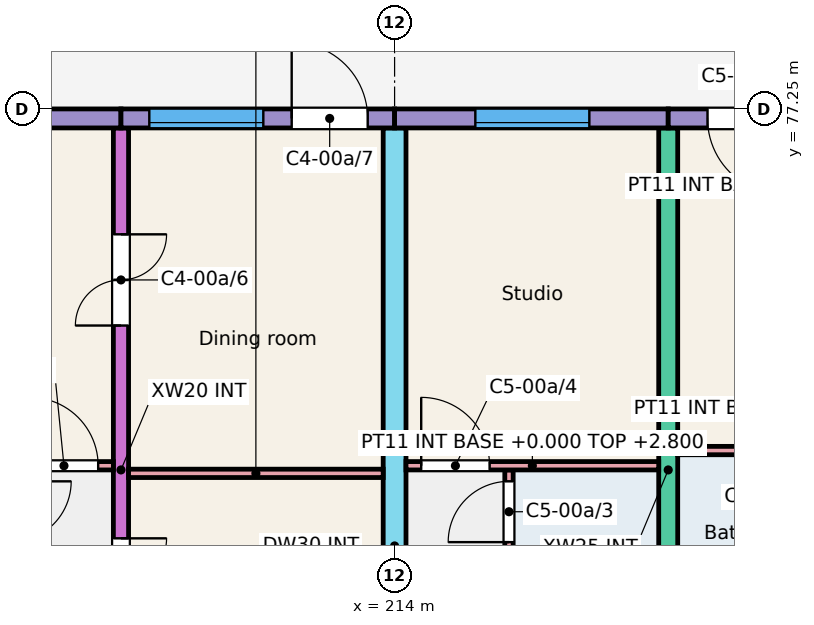
"""IFC4 building model, lengths in metres.
Left out: names, types, materials, properties, quantities, classifications, styles, units other than length and angle.
Written with IfcOpenShell. Run it as: python <this file> out.ifc"""

import sys

from ifc_helpers import new_model, si_unit, direction, frame, frame_2d, origin, place, context, subcontext, project, spatial, rectangle, extrude, element, fill, save


model = new_model("IFC4")
c1 = context("Model", 3, precision=1e-05, world=origin(), true_north=direction((0.0, 1.0)))
c2 = subcontext(c1, "Body", "Model", "MODEL_VIEW")
j1 = project(units=[si_unit("LENGTHUNIT", "METRE"), si_unit("PLANEANGLEUNIT", "RADIAN")], contexts=[c1])
p1 = place(None, origin())
s1 = spatial("IfcSite", under=j1, at=p1, CompositionType="ELEMENT")
p2 = place(p1, origin())
s2 = spatial("IfcBuilding", under=s1, at=p2, CompositionType="ELEMENT")
p3 = place(p2, origin())
s3 = spatial("IfcBuildingStorey", under=s2, at=p3, CompositionType="ELEMENT", Elevation=0.0)
p4 = place(p3, frame((210.4, 68.0, -0.25), z_axis=(0.0, 0.0, 1.0), x_axis=(0.0, 1.0, 0.0)))
e1 = element("IfcWall", 1, at=p4, inside=s3, PredefinedType="SHEAR", context=c2, shape_type="SweptSolid", body=[
    extrude(rectangle(XDim=9.0, YDim=0.2, at=frame_2d((4.5, 0.0))), origin(), (0.0, 0.0, 1.0), 3.25),
])
p5 = place(p4, frame((2.4, 0.0, 0.25)))
e2 = element("IfcOpeningElement", 2, at=p5, cuts=e1, PredefinedType="OPENING", context=c2, shape_type="SweptSolid", body=[
    extrude(rectangle(XDim=1.2, YDim=2.1, at=frame_2d((0.6, 1.05))), frame((0.0, 0.11, 0.0), z_axis=(0.0, -1.0, 0.0), x_axis=(1.0, 0.0, 0.0)), (0.0, 0.0, 1.0), 0.22),
])
p6 = place(p4, frame((6.4, 0.0, 0.25)))
e3 = element("IfcOpeningElement", 3, at=p6, cuts=e1, PredefinedType="OPENING", context=c2, shape_type="SweptSolid", body=[
    extrude(rectangle(XDim=1.2, YDim=2.1, at=frame_2d((0.6, 1.05))), frame((0.0, 0.11, 0.0), z_axis=(0.0, -1.0, 0.0), x_axis=(1.0, 0.0, 0.0)), (0.0, 0.0, 1.0), 0.22),
])
p7 = place(p3, frame((214.0, 66.0, -0.25), z_axis=(0.0, 0.0, 1.0), x_axis=(0.0, 1.0, 0.0)))
e4 = element("IfcWall", 4, at=p7, inside=s3, PredefinedType="SHEAR", context=c2, shape_type="SweptSolid", body=[
    extrude(rectangle(XDim=11.0, YDim=0.3, at=frame_2d((5.5, 0.0))), origin(), (0.0, 0.0, 1.0), 3.25),
])
p8 = place(p7, frame((0.3, 0.0, 0.25)))
e5 = element("IfcOpeningElement", 5, at=p8, cuts=e4, PredefinedType="OPENING", context=c2, shape_type="SweptSolid", body=[
    extrude(rectangle(XDim=1.2, YDim=2.1, at=frame_2d((0.6, 1.05))), frame((0.0, 0.16, 0.0), z_axis=(0.0, -1.0, 0.0), x_axis=(1.0, 0.0, 0.0)), (0.0, 0.0, 1.0), 0.32),
])
p9 = place(p3, frame((217.6, 68.0, -0.25), z_axis=(0.0, 0.0, 1.0), x_axis=(0.0, 1.0, 0.0)))
e6 = element("IfcWall", 6, at=p9, inside=s3, PredefinedType="SHEAR", context=c2, shape_type="SweptSolid", body=[
    extrude(rectangle(XDim=9.0, YDim=0.25, at=frame_2d((4.5, 0.0))), origin(), (0.0, 0.0, 1.0), 3.25),
])
p10 = place(p3, frame((206.8, 77.125, -0.25), z_axis=(0.0, 0.0, 1.0), x_axis=(1.0, 0.0, 0.0)))
e7 = element("IfcWall", 7, at=p10, inside=s3, PredefinedType="SOLIDWALL", context=c2, shape_type="SweptSolid", body=[
    extrude(rectangle(XDim=3.6, YDim=0.25, at=frame_2d((1.8, 0.0))), origin(), (0.0, 0.0, 1.0), 3.25),
])
p11 = place(p10, frame((1.062, 0.0, 1.15)))
e8 = element("IfcOpeningElement", 8, at=p11, cuts=e7, PredefinedType="OPENING", context=c2, shape_type="SweptSolid", body=[
    extrude(rectangle(XDim=1.5, YDim=1.5, at=frame_2d((0.75, 0.75))), frame((0.0, 0.135, 0.0), z_axis=(0.0, -1.0, 0.0), x_axis=(1.0, 0.0, 0.0)), (0.0, 0.0, 1.0), 0.27),
])
p12 = place(p3, frame((210.4, 77.125, -0.25), z_axis=(0.0, 0.0, 1.0), x_axis=(1.0, 0.0, 0.0)))
e9 = element("IfcWall", 9, at=p12, inside=s3, PredefinedType="SOLIDWALL", context=c2, shape_type="SweptSolid", body=[
    extrude(rectangle(XDim=3.6, YDim=0.25, at=frame_2d((1.8, 0.0))), origin(), (0.0, 0.0, 1.0), 3.25),
])
p13 = place(p12, frame((0.373, 0.0, 1.15)))
e10 = element("IfcOpeningElement", 10, at=p13, cuts=e9, PredefinedType="OPENING", context=c2, shape_type="SweptSolid", body=[
    extrude(rectangle(XDim=1.5, YDim=1.5, at=frame_2d((0.75, 0.75))), frame((0.0, 0.135, 0.0), z_axis=(0.0, -1.0, 0.0), x_axis=(1.0, 0.0, 0.0)), (0.0, 0.0, 1.0), 0.27),
])
p14 = place(p12, frame((2.246, 0.0, 0.25)))
e11 = element("IfcOpeningElement", 11, at=p14, cuts=e9, PredefinedType="OPENING", context=c2, shape_type="SweptSolid", body=[
    extrude(rectangle(XDim=1.0, YDim=2.1, at=frame_2d((0.5, 1.05))), frame((0.0, 0.135, 0.0), z_axis=(0.0, -1.0, 0.0), x_axis=(1.0, 0.0, 0.0)), (0.0, 0.0, 1.0), 0.27),
])
p15 = place(p3, frame((214.0, 77.125, -0.25), z_axis=(0.0, 0.0, 1.0), x_axis=(1.0, 0.0, 0.0)))
e12 = element("IfcWall", 12, at=p15, inside=s3, PredefinedType="SOLIDWALL", context=c2, shape_type="SweptSolid", body=[
    extrude(rectangle(XDim=3.6, YDim=0.25, at=frame_2d((1.8, 0.0))), origin(), (0.0, 0.0, 1.0), 3.25),
])
p16 = place(p15, frame((1.062, 0.0, 1.15)))
e13 = element("IfcOpeningElement", 13, at=p16, cuts=e12, PredefinedType="OPENING", context=c2, shape_type="SweptSolid", body=[
    extrude(rectangle(XDim=1.5, YDim=1.5, at=frame_2d((0.75, 0.75))), frame((0.0, 0.135, 0.0), z_axis=(0.0, -1.0, 0.0), x_axis=(1.0, 0.0, 0.0)), (0.0, 0.0, 1.0), 0.27),
])
p17 = place(p3, frame((217.6, 77.125, -0.25), z_axis=(0.0, 0.0, 1.0), x_axis=(1.0, 0.0, 0.0)))
e14 = element("IfcWall", 14, at=p17, inside=s3, PredefinedType="SOLIDWALL", context=c2, shape_type="SweptSolid", body=[
    extrude(rectangle(XDim=3.6, YDim=0.25, at=frame_2d((1.8, 0.0))), origin(), (0.0, 0.0, 1.0), 3.25),
])
p18 = place(p17, frame((1.796, 0.0, 1.15)))
e15 = element("IfcOpeningElement", 15, at=p18, cuts=e14, PredefinedType="OPENING", context=c2, shape_type="SweptSolid", body=[
    extrude(rectangle(XDim=1.5, YDim=1.5, at=frame_2d((0.75, 0.75))), frame((0.0, 0.135, 0.0), z_axis=(0.0, -1.0, 0.0), x_axis=(1.0, 0.0, 0.0)), (0.0, 0.0, 1.0), 0.27),
])
p19 = place(p17, frame((0.517, 0.0, 0.25)))
e16 = element("IfcOpeningElement", 16, at=p19, cuts=e14, PredefinedType="OPENING", context=c2, shape_type="SweptSolid", body=[
    extrude(rectangle(XDim=1.0, YDim=2.1, at=frame_2d((0.5, 1.05))), frame((0.0, 0.135, 0.0), z_axis=(0.0, -1.0, 0.0), x_axis=(1.0, 0.0, 0.0)), (0.0, 0.0, 1.0), 0.27),
])
p20 = place(p3, frame((206.925, 72.555, 0.0), z_axis=(0.0, 0.0, 1.0), x_axis=(1.0, 0.0, 0.0)))
e17 = element("IfcWall", 17, at=p20, inside=s3, PredefinedType="PARTITIONING", context=c2, shape_type="SweptSolid", body=[
    extrude(rectangle(XDim=3.375, YDim=0.11, at=frame_2d((1.688, 0.0))), origin(), (0.0, 0.0, 1.0), 2.8),
])
p21 = place(p20, frame((2.275, 0.0, 0.0)))
e18 = element("IfcOpeningElement", 18, at=p21, cuts=e17, PredefinedType="OPENING", context=c2, shape_type="SweptSolid", body=[
    extrude(rectangle(XDim=0.9, YDim=2.1, at=frame_2d((0.45, 1.05))), frame((0.0, 0.065, 0.0), z_axis=(0.0, -1.0, 0.0), x_axis=(1.0, 0.0, 0.0)), (0.0, 0.0, 1.0), 0.13),
])
p22 = place(p3, frame((210.5, 72.455, 0.0), z_axis=(0.0, 0.0, 1.0), x_axis=(1.0, 0.0, 0.0)))
e19 = element("IfcWall", 19, at=p22, inside=s3, PredefinedType="PARTITIONING", context=c2, shape_type="SweptSolid", body=[
    extrude(rectangle(XDim=3.35, YDim=0.11, at=frame_2d((1.675, 0.0))), origin(), (0.0, 0.0, 1.0), 2.8),
])
p23 = place(p3, frame((215.505, 68.0, 0.0), z_axis=(0.0, 0.0, 1.0), x_axis=(0.0, 1.0, 0.0)))
e20 = element("IfcWall", 20, at=p23, inside=s3, PredefinedType="PARTITIONING", context=c2, shape_type="SweptSolid", body=[
    extrude(rectangle(XDim=4.5, YDim=0.11, at=frame_2d((2.25, 0.0))), origin(), (0.0, 0.0, 1.0), 2.8),
])
p24 = place(p23, frame((0.2, 0.0, 0.0)))
e21 = element("IfcOpeningElement", 21, at=p24, cuts=e20, PredefinedType="OPENING", context=c2, shape_type="SweptSolid", body=[
    extrude(rectangle(XDim=0.8, YDim=2.1, at=frame_2d((0.4, 1.05))), frame((0.0, 0.065, 0.0), z_axis=(0.0, -1.0, 0.0), x_axis=(1.0, 0.0, 0.0)), (0.0, 0.0, 1.0), 0.13),
])
p25 = place(p23, frame((3.55, 0.0, 0.0)))
e22 = element("IfcOpeningElement", 22, at=p25, cuts=e20, PredefinedType="OPENING", context=c2, shape_type="SweptSolid", body=[
    extrude(rectangle(XDim=0.8, YDim=2.1, at=frame_2d((0.4, 1.05))), frame((0.0, 0.065, 0.0), z_axis=(0.0, -1.0, 0.0), x_axis=(1.0, 0.0, 0.0)), (0.0, 0.0, 1.0), 0.13),
])
p26 = place(p3, frame((214.15, 72.555, 0.0), z_axis=(0.0, 0.0, 1.0), x_axis=(1.0, 0.0, 0.0)))
e23 = element("IfcWall", 23, at=p26, inside=s3, PredefinedType="PARTITIONING", context=c2, shape_type="SweptSolid", body=[
    extrude(rectangle(XDim=3.325, YDim=0.11, at=frame_2d((1.663, 0.0))), origin(), (0.0, 0.0, 1.0), 2.8),
])
p27 = place(p26, frame((0.2, 0.0, 0.0)))
e24 = element("IfcOpeningElement", 24, at=p27, cuts=e23, PredefinedType="OPENING", context=c2, shape_type="SweptSolid", body=[
    extrude(rectangle(XDim=0.9, YDim=2.1, at=frame_2d((0.45, 1.05))), frame((0.0, 0.065, 0.0), z_axis=(0.0, -1.0, 0.0), x_axis=(1.0, 0.0, 0.0)), (0.0, 0.0, 1.0), 0.13),
])
p28 = place(p3, frame((217.725, 72.755, 0.0), z_axis=(0.0, 0.0, 1.0), x_axis=(1.0, 0.0, 0.0)))
e25 = element("IfcWall", 25, at=p28, inside=s3, PredefinedType="PARTITIONING", context=c2, shape_type="SweptSolid", body=[
    extrude(rectangle(XDim=3.35, YDim=0.11, at=frame_2d((1.675, 0.0))), origin(), (0.0, 0.0, 1.0), 2.8),
])
p29 = place(p28, frame((2.25, 0.0, 0.0)))
e26 = element("IfcOpeningElement", 26, at=p29, cuts=e25, PredefinedType="OPENING", context=c2, shape_type="SweptSolid", body=[
    extrude(rectangle(XDim=0.9, YDim=2.1, at=frame_2d((0.45, 1.05))), frame((0.0, 0.065, 0.0), z_axis=(0.0, -1.0, 0.0), x_axis=(1.0, 0.0, 0.0)), (0.0, 0.0, 1.0), 0.13),
])
p30 = place(p13, origin())
e27 = element("IfcWindow", 27, at=p30, inside=s3, PartitioningType="SINGLE_PANEL", PredefinedType="WINDOW", context=c2, shape_type="SweptSolid", body=[
    extrude(rectangle(XDim=1.5, YDim=1.5, at=frame_2d((0.75, 0.75))), frame((0.0, -0.025, 0.0), z_axis=(0.0, -1.0, 0.0), x_axis=(1.0, 0.0, 0.0)), (0.0, 0.0, 1.0), 0.06),
])
fill(e10, e27)
p31 = place(p16, origin())
e28 = element("IfcWindow", 28, at=p31, inside=s3, PartitioningType="SINGLE_PANEL", PredefinedType="WINDOW", context=c2, shape_type="SweptSolid", body=[
    extrude(rectangle(XDim=1.5, YDim=1.5, at=frame_2d((0.75, 0.75))), frame((0.0, -0.025, 0.0), z_axis=(0.0, -1.0, 0.0), x_axis=(1.0, 0.0, 0.0)), (0.0, 0.0, 1.0), 0.06),
])
fill(e13, e28)
p32 = place(p21, origin())
e29 = element("IfcDoor", 29, at=p32, inside=s3, OperationType="SINGLE_SWING_LEFT", PredefinedType="DOOR", context=c2, shape_type="SweptSolid", body=[
    extrude(rectangle(XDim=0.9, YDim=2.1, at=frame_2d((0.45, 1.05))), frame((0.0, 0.025, 0.0), z_axis=(0.0, -1.0, 0.0), x_axis=(1.0, 0.0, 0.0)), (0.0, 0.0, 1.0), 0.05),
])
fill(e18, e29)
p33 = place(p5, origin())
e30 = element("IfcDoor", 30, at=p33, inside=s3, OperationType="DOUBLE_DOOR_SINGLE_SWING", PredefinedType="DOOR", context=c2, shape_type="SweptSolid", body=[
    extrude(rectangle(XDim=1.2, YDim=2.1, at=frame_2d((0.6, 1.05))), frame((0.0, 0.025, 0.0), z_axis=(0.0, -1.0, 0.0), x_axis=(1.0, 0.0, 0.0)), (0.0, 0.0, 1.0), 0.05),
])
fill(e2, e30)
p34 = place(p6, origin())
e31 = element("IfcDoor", 31, at=p34, inside=s3, OperationType="DOUBLE_DOOR_SINGLE_SWING", PredefinedType="DOOR", context=c2, shape_type="SweptSolid", body=[
    extrude(rectangle(XDim=1.2, YDim=2.1, at=frame_2d((0.6, 1.05))), frame((0.0, 0.025, 0.0), z_axis=(0.0, -1.0, 0.0), x_axis=(1.0, 0.0, 0.0)), (0.0, 0.0, 1.0), 0.05),
])
fill(e3, e31)
p35 = place(p14, origin())
e32 = element("IfcDoor", 32, at=p35, inside=s3, OperationType="SINGLE_SWING_LEFT", PredefinedType="DOOR", context=c2, shape_type="SweptSolid", body=[
    extrude(rectangle(XDim=1.0, YDim=2.1, at=frame_2d((0.5, 1.05))), frame((0.0, 0.025, 0.0), z_axis=(0.0, -1.0, 0.0), x_axis=(1.0, 0.0, 0.0)), (0.0, 0.0, 1.0), 0.05),
])
fill(e11, e32)
p36 = place(p25, origin())
e33 = element("IfcDoor", 33, at=p36, inside=s3, OperationType="SINGLE_SWING_LEFT", PredefinedType="DOOR", context=c2, shape_type="SweptSolid", body=[
    extrude(rectangle(XDim=0.8, YDim=2.1, at=frame_2d((0.4, 1.05))), frame((0.0, 0.025, 0.0), z_axis=(0.0, -1.0, 0.0), x_axis=(1.0, 0.0, 0.0)), (0.0, 0.0, 1.0), 0.05),
])
fill(e22, e33)
p37 = place(p27, origin())
e34 = element("IfcDoor", 34, at=p37, inside=s3, OperationType="SINGLE_SWING_LEFT", PredefinedType="DOOR", context=c2, shape_type="SweptSolid", body=[
    extrude(rectangle(XDim=0.9, YDim=2.1, at=frame_2d((0.45, 1.05))), frame((0.0, 0.025, 0.0), z_axis=(0.0, -1.0, 0.0), x_axis=(1.0, 0.0, 0.0)), (0.0, 0.0, 1.0), 0.05),
])
fill(e24, e34)
p38 = place(p19, origin())
e35 = element("IfcDoor", 35, at=p38, inside=s3, OperationType="SINGLE_SWING_RIGHT", PredefinedType="DOOR", context=c2, shape_type="SweptSolid", body=[
    extrude(rectangle(XDim=1.0, YDim=2.1, at=frame_2d((0.5, 1.05))), frame((0.0, 0.025, 0.0), z_axis=(0.0, -1.0, 0.0), x_axis=(1.0, 0.0, 0.0)), (0.0, 0.0, 1.0), 0.05),
])
fill(e16, e35)
save(model, sys.argv[1])
